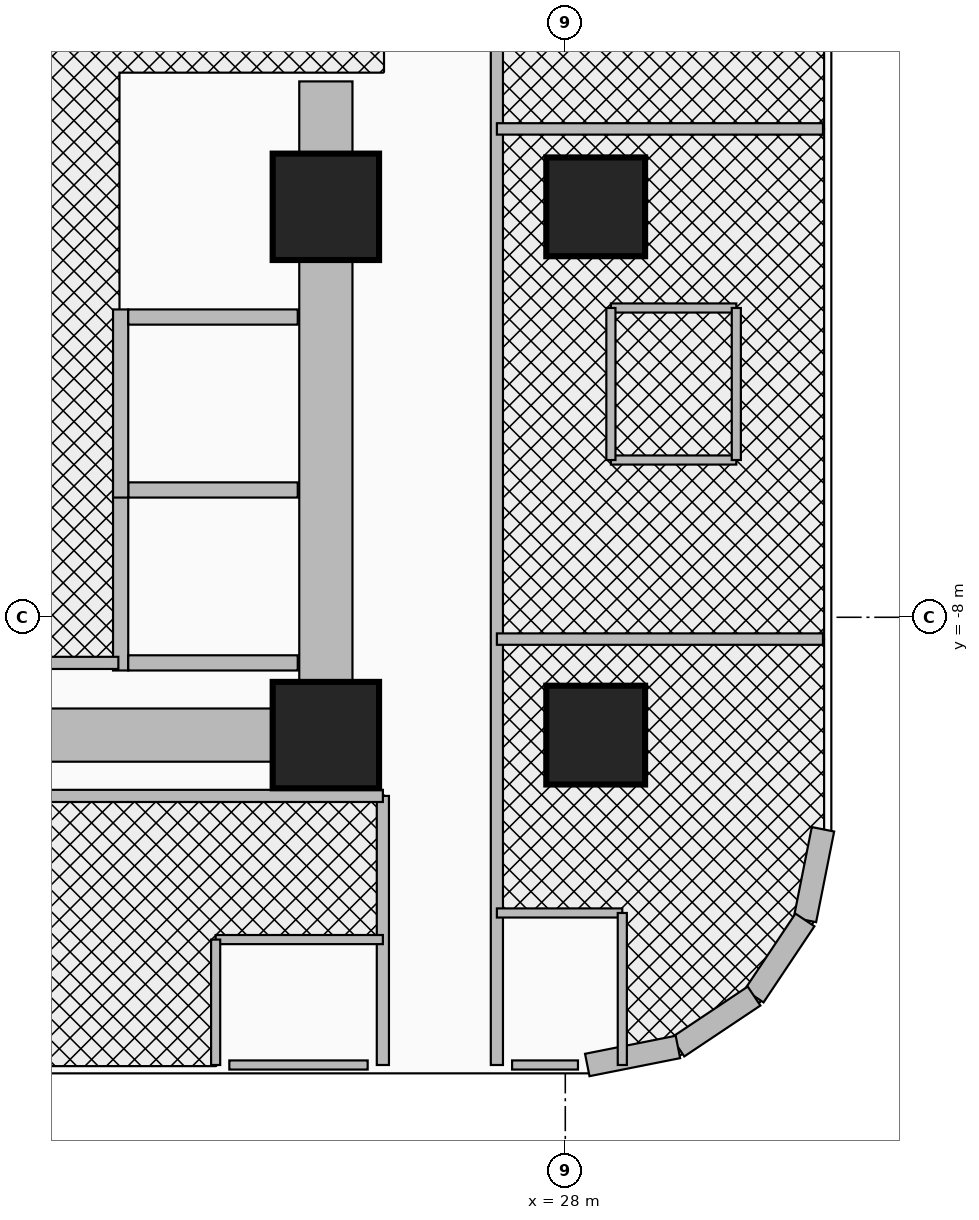
"""IFC4 building model, lengths in metres.
Left out: names, types, materials, properties, quantities, classifications, styles, units other than length and angle.
Written with IfcOpenShell. Run it as: python <this file> out.ifc"""

import sys

from ifc_helpers import new_model, si_unit, direction, frame, frame_2d, origin, origin_2d, place, context, subcontext, project, spatial, rectangle, circle, extrude, source, transform, mapped, element, fill, save


model = new_model("IFC4")
c1 = context("Model", 3, precision=1e-05, world=origin(), true_north=direction((0.0, 1.0)))
c2 = subcontext(c1, "Body", "Model", "MODEL_VIEW")
j1 = project(units=[si_unit("LENGTHUNIT", "METRE"), si_unit("PLANEANGLEUNIT", "RADIAN")], contexts=[c1])
p1 = place(None, origin())
s1 = spatial("IfcSite", under=j1, at=p1, CompositionType="ELEMENT")
p2 = place(p1, origin())
s2 = spatial("IfcBuilding", under=s1, at=p2, CompositionType="ELEMENT")
p3 = place(p2, frame((0.0, 0.0, 26.0)))
s3 = spatial("IfcBuildingStorey", under=s2, at=p3, CompositionType="ELEMENT", Elevation=26.0)
p4 = place(p3, frame((24.85, -9.9, 0.0), z_axis=(0.0, 0.0, 1.0), x_axis=(0.0, 1.0, 0.0)))
e1 = element("IfcWall", 1, at=p4, inside=s3, PredefinedType="SHEAR", context=c2, shape_type="SweptSolid", body=[
    extrude(rectangle(XDim=8.95, YDim=0.7, at=frame_2d((4.475, 0.0))), origin(), (0.0, 0.0, 1.0), 3.46),
])
p5 = place(p3, frame((15.85, -9.55, 0.0), z_axis=(0.0, 0.0, 1.0), x_axis=(1.0, 0.0, 0.0)))
e2 = element("IfcWall", 2, at=p5, inside=s3, PredefinedType="SHEAR", context=c2, shape_type="SweptSolid", body=[
    extrude(rectangle(XDim=9.0, YDim=0.7, at=frame_2d((4.5, 0.0))), origin(), (0.0, 0.0, 1.0), 3.46),
])
m1 = source(origin(), c2, "Body", "SweptSolid", [
    extrude(rectangle(XDim=1.4, YDim=1.4, at=origin_2d()), origin(), (0.0, 0.0, 1.0), 3.7),
])
p6 = place(p3, frame((24.85, -9.55, 0.0), z_axis=(0.0, 0.0, 1.0), x_axis=(1.0, 0.0, 0.0)))
e3 = element("IfcColumn", 3, at=p6, inside=s3, PredefinedType="COLUMN", context=c2, shape_type="MappedRepresentation", body=[
    mapped(m1, transform((0.0, 0.0, 0.0), x_axis=(1.0, 0.0, 0.0), y_axis=(0.0, 1.0, 0.0), z_axis=(0.0, 0.0, 1.0), scale=1.0)),
])
m2 = source(origin(), c2, "Body", "SweptSolid", [
    extrude(circle(Radius=0.65, at=origin_2d()), origin(), (0.0, 0.0, 1.0), 3.7),
])
p7 = place(p3, frame((28.4, -9.55, 0.0), z_axis=(0.0, 0.0, 1.0), x_axis=(1.0, 0.0, 0.0)))
e4 = element("IfcColumn", 4, at=p7, inside=s3, PredefinedType="COLUMN", context=c2, shape_type="MappedRepresentation", body=[
    mapped(m2, transform((0.0, 0.0, 0.0), x_axis=(1.0, 0.0, 0.0), y_axis=(0.0, 1.0, 0.0), z_axis=(0.0, 0.0, 1.0), scale=1.0)),
])
p8 = place(p3, frame((24.85, -2.6, 0.0), z_axis=(0.0, 0.0, 1.0), x_axis=(1.0, 0.0, 0.0)))
e5 = element("IfcColumn", 5, at=p8, inside=s3, PredefinedType="COLUMN", context=c2, shape_type="MappedRepresentation", body=[
    mapped(m1, transform((0.0, 0.0, 0.0), x_axis=(1.0, 0.0, 0.0), y_axis=(0.0, 1.0, 0.0), z_axis=(0.0, 0.0, 1.0), scale=1.0)),
])
p9 = place(p3, frame((28.4, -2.6, 0.0), z_axis=(0.0, 0.0, 1.0), x_axis=(1.0, 0.0, 0.0)))
e6 = element("IfcColumn", 6, at=p9, inside=s3, PredefinedType="COLUMN", context=c2, shape_type="MappedRepresentation", body=[
    mapped(m2, transform((0.0, 0.0, 0.0), x_axis=(1.0, 0.0, 0.0), y_axis=(0.0, 1.0, 0.0), z_axis=(0.0, 0.0, 1.0), scale=1.0)),
])
p10 = place(p3, frame((31.39, -10.789, 0.0), z_axis=(0.0, 0.0, 1.0), x_axis=(-0.194996050505, -0.980804027463, 0.0)))
e7 = element("IfcWall", 7, at=p10, inside=s3, PredefinedType="SOLIDWALL", context=c2, shape_type="SweptSolid", body=[
    extrude(rectangle(XDim=1.216, YDim=0.3, at=frame_2d((0.608, 0.0))), origin(), (0.0, 0.0, 1.0), 3.46),
])
for number, where, z_axis, x_axis in (
    (8, (31.153, -11.982, 0.0), (0.0, 0.0, 1.0), (-0.556, -0.831, 0.0)),
    (9, (30.483, -12.983, 0.0), (0.0, 0.0, 1.0), (-0.831, -0.556, 0.0)),
):
    element("IfcWall", number, at=place(p3, frame(where, z_axis=z_axis, x_axis=x_axis)), inside=s3, PredefinedType="SOLIDWALL", context=c2, shape_type="SweptSolid", body=[
        extrude(rectangle(XDim=1.205, YDim=0.3, at=frame_2d((0.603, 0.0))), origin(), (0.0, 0.0, 1.0), 3.46),
    ])
p11 = place(p3, frame((29.482, -13.653, 0.0), z_axis=(0.0, 0.0, 1.0), x_axis=(-0.980804027463, -0.194996050505, 0.0)))
e10 = element("IfcWall", 10, at=p11, inside=s3, PredefinedType="SOLIDWALL", context=c2, shape_type="SweptSolid", body=[
    extrude(rectangle(XDim=1.216, YDim=0.3, at=frame_2d((0.608, 0.0))), origin(), (0.0, 0.0, 1.0), 3.46),
])
p12 = place(p3, frame((22.15, -8.7, 0.0), z_axis=(0.0, 0.0, 1.0), x_axis=(0.0, 1.0, 0.0)))
e11 = element("IfcWall", 11, at=p12, inside=s3, PredefinedType="MOVABLE", context=c2, shape_type="SweptSolid", body=[
    extrude(rectangle(XDim=2.475, YDim=0.2, at=frame_2d((1.237, 0.0))), origin(), (0.0, 0.0, 1.0), 3.46),
])
p13 = place(p12, frame((0.688, 0.0, 0.0)))
e12 = element("IfcOpeningElement", 12, at=p13, cuts=e11, PredefinedType="OPENING", context=c2, shape_type="SweptSolid", body=[
    extrude(rectangle(XDim=1.1, YDim=2.1, at=frame_2d((0.55, 1.05))), frame((0.0, 0.115, 0.0), z_axis=(0.0, -1.0, 0.0), x_axis=(1.0, 0.0, 0.0)), (0.0, 0.0, 1.0), 0.23),
])
for number, where, z_axis, x_axis in (
    (13, (22.25, -8.6, 0.0), (0.0, 0.0, 1.0), (1.0, 0.0, 0.0)),
    (14, (22.25, -6.325, 0.0), (0.0, 0.0, 1.0), (1.0, 0.0, 0.0)),
):
    element("IfcWall", number, at=place(p3, frame(where, z_axis=z_axis, x_axis=x_axis)), inside=s3, PredefinedType="MOVABLE", context=c2, shape_type="SweptSolid", body=[
        extrude(rectangle(XDim=2.23, YDim=0.2, at=frame_2d((1.115, 0.0))), origin(), (0.0, 0.0, 1.0), 3.46),
    ])
p14 = place(p3, frame((22.15, -6.425, 0.0), z_axis=(0.0, 0.0, 1.0), x_axis=(0.0, 1.0, 0.0)))
e15 = element("IfcWall", 15, at=p14, inside=s3, PredefinedType="MOVABLE", context=c2, shape_type="SweptSolid", body=[
    extrude(rectangle(XDim=2.475, YDim=0.2, at=frame_2d((1.238, 0.0))), origin(), (0.0, 0.0, 1.0), 3.46),
])
p15 = place(p14, frame((0.688, 0.0, 0.0)))
e16 = element("IfcOpeningElement", 16, at=p15, cuts=e15, PredefinedType="OPENING", context=c2, shape_type="SweptSolid", body=[
    extrude(rectangle(XDim=1.1, YDim=2.1, at=frame_2d((0.55, 1.05))), frame((0.0, 0.115, 0.0), z_axis=(0.0, -1.0, 0.0), x_axis=(1.0, 0.0, 0.0)), (0.0, 0.0, 1.0), 0.23),
])
p16 = place(p3, frame((22.25, -4.05, 0.0), z_axis=(0.0, 0.0, 1.0), x_axis=(1.0, 0.0, 0.0)))
e17 = element("IfcWall", 17, at=p16, inside=s3, PredefinedType="MOVABLE", context=c2, shape_type="SweptSolid", body=[
    extrude(rectangle(XDim=2.23, YDim=0.2, at=frame_2d((1.115, 0.0))), origin(), (0.0, 0.0, 1.0), 3.46),
])
p17 = place(p3, frame((20.3, -8.6, 0.0), z_axis=(0.0, 0.0, 1.0), x_axis=(1.0, 0.0, 0.0)))
e18 = element("IfcWall", 18, at=p17, inside=s3, PredefinedType="PARTITIONING", context=c2, shape_type="SweptSolid", body=[
    extrude(rectangle(XDim=1.82, YDim=0.16, at=frame_2d((0.91, 0.0))), origin(), (0.0, 0.0, 1.0), 3.46),
])
p18 = place(p3, frame((25.6, -13.89, 0.0), z_axis=(0.0, 0.0, 1.0), x_axis=(0.0, 1.0, 0.0)))
e19 = element("IfcWall", 19, at=p18, inside=s3, PredefinedType="PARTITIONING", context=c2, shape_type="SweptSolid", body=[
    extrude(rectangle(XDim=3.54, YDim=0.16, at=frame_2d((1.77, 0.0))), origin(), (0.0, 0.0, 1.0), 3.46),
])
p19 = place(p18, frame((2.12, 0.0, 0.0)))
e20 = element("IfcOpeningElement", 20, at=p19, cuts=e19, PredefinedType="OPENING", context=c2, shape_type="SweptSolid", body=[
    extrude(rectangle(XDim=0.95, YDim=2.15, at=frame_2d((0.475, 1.075))), frame((0.0, 0.095, 0.0), z_axis=(0.0, -1.0, 0.0), x_axis=(1.0, 0.0, 0.0)), (0.0, 0.0, 1.0), 0.19),
])
p20 = place(p3, frame((13.41, -10.35, 0.0), z_axis=(0.0, 0.0, 1.0), x_axis=(1.0, 0.0, 0.0)))
e21 = element("IfcWall", 21, at=p20, inside=s3, PredefinedType="PARTITIONING", context=c2, shape_type="SweptSolid", body=[
    extrude(rectangle(XDim=12.19, YDim=0.16, at=frame_2d((6.095, 0.0))), origin(), (0.0, 0.0, 1.0), 3.46),
])
p21 = place(p3, frame((23.4, -12.24, 0.0), z_axis=(0.0, 0.0, 1.0), x_axis=(1.0, 0.0, 0.0)))
e22 = element("IfcWall", 22, at=p21, inside=s3, PredefinedType="PARTITIONING", context=c2, shape_type="SweptSolid", body=[
    extrude(rectangle(XDim=2.2, YDim=0.12, at=frame_2d((1.1, 0.0))), origin(), (0.0, 0.0, 1.0), 3.46),
])
p22 = place(p3, frame((23.4, -13.89, 0.0), z_axis=(0.0, 0.0, 1.0), x_axis=(0.0, 1.0, 0.0)))
e23 = element("IfcWall", 23, at=p22, inside=s3, PredefinedType="PARTITIONING", context=c2, shape_type="SweptSolid", body=[
    extrude(rectangle(XDim=1.65, YDim=0.12, at=frame_2d((0.825, 0.0))), origin(), (0.0, 0.0, 1.0), 3.46),
])
p23 = place(p22, frame((0.4, 0.0, 0.0)))
e24 = element("IfcOpeningElement", 24, at=p23, cuts=e23, PredefinedType="OPENING", context=c2, shape_type="SweptSolid", body=[
    extrude(rectangle(XDim=0.85, YDim=2.1, at=frame_2d((0.425, 1.05))), frame((0.0, 0.075, 0.0), z_axis=(0.0, -1.0, 0.0), x_axis=(1.0, 0.0, 0.0)), (0.0, 0.0, 1.0), 0.15),
])
p24 = place(p3, frame((23.58, -13.89, 0.0), z_axis=(0.0, 0.0, 1.0), x_axis=(1.0, 0.0, 0.0)))
e25 = element("IfcWall", 25, at=p24, inside=s3, PredefinedType="PARTITIONING", context=c2, shape_type="SweptSolid", body=[
    extrude(rectangle(XDim=1.82, YDim=0.12, at=frame_2d((0.91, 0.0))), origin(), (0.0, 0.0, 1.0), 3.46),
])
p25 = place(p3, frame((27.1, -13.89, 0.0), z_axis=(0.0, 0.0, 1.0), x_axis=(0.0, 1.0, 0.0)))
e26 = element("IfcWall", 26, at=p25, inside=s3, PredefinedType="PARTITIONING", context=c2, shape_type="SweptSolid", body=[
    extrude(rectangle(XDim=25.74, YDim=0.16, at=frame_2d((12.87, 0.0))), origin(), (0.0, 0.0, 1.0), 2.583),
])
p26 = place(p25, frame((2.62, 0.0, 0.0)))
e27 = element("IfcOpeningElement", 27, at=p26, cuts=e26, PredefinedType="OPENING", context=c2, shape_type="SweptSolid", body=[
    extrude(rectangle(XDim=0.95, YDim=2.15, at=frame_2d((0.475, 1.075))), frame((0.0, 0.095, 0.0), z_axis=(0.0, -1.0, 0.0), x_axis=(1.0, 0.0, 0.0)), (0.0, 0.0, 1.0), 0.19),
])
p27 = place(p25, frame((8.484, 0.0, 0.0)))
e28 = element("IfcOpeningElement", 28, at=p27, cuts=e26, PredefinedType="OPENING", context=c2, shape_type="SweptSolid", body=[
    extrude(rectangle(XDim=0.95, YDim=2.15, at=frame_2d((0.475, 1.075))), frame((0.0, 0.095, 0.0), z_axis=(0.0, -1.0, 0.0), x_axis=(1.0, 0.0, 0.0)), (0.0, 0.0, 1.0), 0.19),
])
p28 = place(p25, frame((14.197, 0.0, 0.0)))
e29 = element("IfcOpeningElement", 29, at=p28, cuts=e26, PredefinedType="OPENING", context=c2, shape_type="SweptSolid", body=[
    extrude(rectangle(XDim=0.95, YDim=2.15, at=frame_2d((0.475, 1.075))), frame((0.0, 0.095, 0.0), z_axis=(0.0, -1.0, 0.0), x_axis=(1.0, 0.0, 0.0)), (0.0, 0.0, 1.0), 0.19),
])
p29 = place(p25, frame((21.648, 0.0, 0.0)))
e30 = element("IfcOpeningElement", 30, at=p29, cuts=e26, PredefinedType="OPENING", context=c2, shape_type="SweptSolid", body=[
    extrude(rectangle(XDim=0.95, YDim=2.15, at=frame_2d((0.475, 1.075))), frame((0.0, 0.095, 0.0), z_axis=(0.0, -1.0, 0.0), x_axis=(1.0, 0.0, 0.0)), (0.0, 0.0, 1.0), 0.19),
])
for number, where, z_axis, x_axis in (
    (31, (27.1, -8.287, 0.0), (0.0, 0.0, 1.0), (1.0, 0.0, 0.0)),
    (32, (27.1, -1.575, 0.0), (0.0, 0.0, 1.0), (1.0, 0.0, 0.0)),
):
    element("IfcWall", number, at=place(p3, frame(where, z_axis=z_axis, x_axis=x_axis)), inside=s3, PredefinedType="PARTITIONING", context=c2, shape_type="SweptSolid", body=[
        extrude(rectangle(XDim=4.29, YDim=0.15, at=frame_2d((2.145, 0.0))), origin(), (0.0, 0.0, 1.0), 2.896),
    ])
p30 = place(p3, frame((27.1, -11.89, 0.0), z_axis=(0.0, 0.0, 1.0), x_axis=(1.0, 0.0, 0.0)))
e33 = element("IfcWall", 33, at=p30, inside=s3, PredefinedType="PARTITIONING", context=c2, shape_type="SweptSolid", body=[
    extrude(rectangle(XDim=1.65, YDim=0.12, at=frame_2d((0.825, 0.0))), origin(), (0.0, 0.0, 1.0), 3.46),
])
p31 = place(p3, frame((28.75, -13.89, 0.0), z_axis=(0.0, 0.0, 1.0), x_axis=(0.0, 1.0, 0.0)))
e34 = element("IfcWall", 34, at=p31, inside=s3, PredefinedType="PARTITIONING", context=c2, shape_type="SweptSolid", body=[
    extrude(rectangle(XDim=2.0, YDim=0.12, at=frame_2d((1.0, 0.0))), origin(), (0.0, 0.0, 1.0), 3.46),
])
p32 = place(p31, frame((0.575, 0.0, 0.0)))
e35 = element("IfcOpeningElement", 35, at=p32, cuts=e34, PredefinedType="OPENING", context=c2, shape_type="SweptSolid", body=[
    extrude(rectangle(XDim=0.85, YDim=2.1, at=frame_2d((0.425, 1.05))), frame((0.0, 0.075, 0.0), z_axis=(0.0, -1.0, 0.0), x_axis=(1.0, 0.0, 0.0)), (0.0, 0.0, 1.0), 0.15),
])
p33 = place(p3, frame((27.3, -13.89, 0.0), z_axis=(0.0, 0.0, 1.0), x_axis=(1.0, 0.0, 0.0)))
e36 = element("IfcWall", 36, at=p33, inside=s3, PredefinedType="PARTITIONING", context=c2, shape_type="SweptSolid", body=[
    extrude(rectangle(XDim=0.867, YDim=0.12, at=frame_2d((0.433, 0.0))), origin(), (0.0, 0.0, 1.0), 3.46),
])
for number, where, z_axis, x_axis in (
    (37, (28.6, -5.931, 0.0), (0.0, 0.0, 1.0), (1.0, 0.0, 0.0)),
    (38, (28.6, -3.931, 0.0), (0.0, 0.0, 1.0), (1.0, 0.0, 0.0)),
):
    element("IfcWall", number, at=place(p3, frame(where, z_axis=z_axis, x_axis=x_axis)), inside=s3, PredefinedType="PARTITIONING", context=c2, shape_type="SweptSolid", body=[
        extrude(rectangle(XDim=1.65, YDim=0.12, at=frame_2d((0.825, 0.0))), origin(), (0.0, 0.0, 1.0), 3.46),
    ])
p34 = place(p3, frame((30.25, -5.931, 0.0), z_axis=(0.0, 0.0, 1.0), x_axis=(0.0, 1.0, 0.0)))
e39 = element("IfcWall", 39, at=p34, inside=s3, PredefinedType="PARTITIONING", context=c2, shape_type="SweptSolid", body=[
    extrude(rectangle(XDim=2.0, YDim=0.12, at=frame_2d((1.0, 0.0))), origin(), (0.0, 0.0, 1.0), 3.46),
])
p35 = place(p3, frame((28.6, -5.931, 0.0), z_axis=(0.0, 0.0, 1.0), x_axis=(0.0, 1.0, 0.0)))
e40 = element("IfcWall", 40, at=p35, inside=s3, PredefinedType="PARTITIONING", context=c2, shape_type="SweptSolid", body=[
    extrude(rectangle(XDim=2.0, YDim=0.12, at=frame_2d((1.0, 0.0))), origin(), (0.0, 0.0, 1.0), 3.46),
])
p36 = place(p35, frame((0.575, 0.0, 0.0)))
e41 = element("IfcOpeningElement", 41, at=p36, cuts=e40, PredefinedType="OPENING", context=c2, shape_type="SweptSolid", body=[
    extrude(rectangle(XDim=0.85, YDim=2.1, at=frame_2d((0.425, 1.05))), frame((0.0, 0.075, 0.0), z_axis=(0.0, -1.0, 0.0), x_axis=(1.0, 0.0, 0.0)), (0.0, 0.0, 1.0), 0.15),
])
p37 = place(p13, origin())
e42 = element("IfcDoor", 42, at=p37, inside=s3, OperationType="DOUBLE_DOOR_SLIDING", PredefinedType="DOOR", context=c2, shape_type="SweptSolid", body=[
    extrude(rectangle(XDim=1.1, YDim=2.1, at=frame_2d((0.55, 1.05))), frame((0.0, 0.025, 0.0), z_axis=(0.0, -1.0, 0.0), x_axis=(1.0, 0.0, 0.0)), (0.0, 0.0, 1.0), 0.05),
])
fill(e12, e42)
p38 = place(p15, origin())
e43 = element("IfcDoor", 43, at=p38, inside=s3, OperationType="DOUBLE_DOOR_SLIDING", PredefinedType="DOOR", context=c2, shape_type="SweptSolid", body=[
    extrude(rectangle(XDim=1.1, YDim=2.1, at=frame_2d((0.55, 1.05))), frame((0.0, 0.025, 0.0), z_axis=(0.0, -1.0, 0.0), x_axis=(1.0, 0.0, 0.0)), (0.0, 0.0, 1.0), 0.05),
])
fill(e16, e43)
p39 = place(p19, frame((0.95, 0.0, 0.0), z_axis=(0.0, 0.0, 1.0), x_axis=(-1.0, 0.0, 0.0)))
e44 = element("IfcDoor", 44, at=p39, inside=s3, OperationType="SINGLE_SWING_LEFT", PredefinedType="DOOR", context=c2, shape_type="SweptSolid", body=[
    extrude(rectangle(XDim=0.95, YDim=2.15, at=frame_2d((0.475, 1.075))), frame((0.0, 0.025, 0.0), z_axis=(0.0, -1.0, 0.0), x_axis=(1.0, 0.0, 0.0)), (0.0, 0.0, 1.0), 0.05),
])
fill(e20, e44)
p40 = place(p23, origin())
e45 = element("IfcDoor", 45, at=p40, inside=s3, OperationType="SINGLE_SWING_RIGHT", PredefinedType="DOOR", context=c2, shape_type="SweptSolid", body=[
    extrude(rectangle(XDim=0.85, YDim=2.1, at=frame_2d((0.425, 1.05))), frame((0.0, 0.025, 0.0), z_axis=(0.0, -1.0, 0.0), x_axis=(1.0, 0.0, 0.0)), (0.0, 0.0, 1.0), 0.05),
])
fill(e24, e45)
p41 = place(p26, origin())
e46 = element("IfcDoor", 46, at=p41, inside=s3, OperationType="SINGLE_SWING_RIGHT", PredefinedType="DOOR", context=c2, shape_type="SweptSolid", body=[
    extrude(rectangle(XDim=0.95, YDim=2.15, at=frame_2d((0.475, 1.075))), frame((0.0, 0.025, 0.0), z_axis=(0.0, -1.0, 0.0), x_axis=(1.0, 0.0, 0.0)), (0.0, 0.0, 1.0), 0.05),
])
fill(e27, e46)
p42 = place(p32, origin())
e47 = element("IfcDoor", 47, at=p42, inside=s3, OperationType="SINGLE_SWING_LEFT", PredefinedType="DOOR", context=c2, shape_type="SweptSolid", body=[
    extrude(rectangle(XDim=0.85, YDim=2.1, at=frame_2d((0.425, 1.05))), frame((0.0, 0.025, 0.0), z_axis=(0.0, -1.0, 0.0), x_axis=(1.0, 0.0, 0.0)), (0.0, 0.0, 1.0), 0.05),
])
fill(e35, e47)
p43 = place(p27, origin())
e48 = element("IfcDoor", 48, at=p43, inside=s3, OperationType="SINGLE_SWING_RIGHT", PredefinedType="DOOR", context=c2, shape_type="SweptSolid", body=[
    extrude(rectangle(XDim=0.95, YDim=2.15, at=frame_2d((0.475, 1.075))), frame((0.0, 0.025, 0.0), z_axis=(0.0, -1.0, 0.0), x_axis=(1.0, 0.0, 0.0)), (0.0, 0.0, 1.0), 0.05),
])
fill(e28, e48)
p44 = place(p36, origin())
e49 = element("IfcDoor", 49, at=p44, inside=s3, OperationType="SINGLE_SWING_LEFT", PredefinedType="DOOR", context=c2, shape_type="SweptSolid", body=[
    extrude(rectangle(XDim=0.85, YDim=2.1, at=frame_2d((0.425, 1.05))), frame((0.0, 0.025, 0.0), z_axis=(0.0, -1.0, 0.0), x_axis=(1.0, 0.0, 0.0)), (0.0, 0.0, 1.0), 0.05),
])
fill(e41, e49)
save(model, sys.argv[1])
